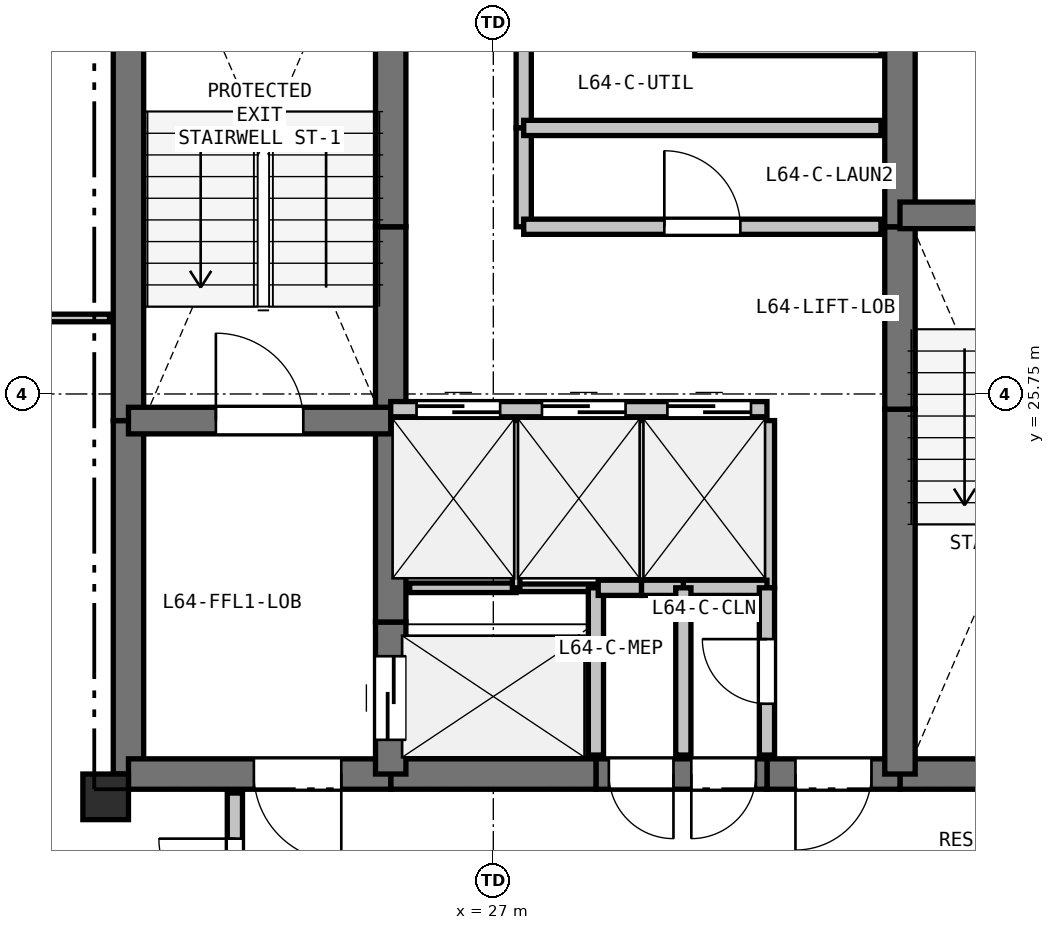
"""IFC4 building model, lengths in metres.
Left out: names, types, materials, properties, quantities, classifications, styles, units other than length and angle.
Written with IfcOpenShell. Run it as: python <this file> out.ifc"""

import sys

from ifc_helpers import new_model, si_unit, direction, frame, frame_2d, origin, origin_2d, place, context, subcontext, project, spatial, rectangle, extrude, element, fill, save


model = new_model("IFC4")
c1 = context("Model", 3, precision=1e-05, world=origin(), true_north=direction((0.0, 1.0)))
c2 = subcontext(c1, "Body", "Model", "MODEL_VIEW")
j1 = project(units=[si_unit("LENGTHUNIT", "METRE"), si_unit("PLANEANGLEUNIT", "RADIAN")], contexts=[c1])
p1 = place(None, origin())
s1 = spatial("IfcSite", under=j1, at=p1, CompositionType="ELEMENT")
p2 = place(p1, origin())
s2 = spatial("IfcBuilding", under=s1, at=p2, CompositionType="ELEMENT")
p3 = place(p2, frame((0.0, 0.0, 229.8)))
s3 = spatial("IfcBuildingStorey", under=s2, at=p3, CompositionType="ELEMENT", Elevation=229.8)
p4 = place(p3, frame((21.9, 20.45, 0.0), z_axis=(0.0, 0.0, 1.0), x_axis=(1.0, 0.0, 0.0)))
e1 = element("IfcColumn", 1, at=p4, inside=s3, PredefinedType="COLUMN", context=c2, shape_type="SweptSolid", body=[
    extrude(rectangle(XDim=0.6, YDim=0.6, at=origin_2d()), origin(), (0.0, 0.0, 1.0), 3.3),
])
p5 = place(p3, frame((22.2, 20.75, 0.0), z_axis=(0.0, 0.0, 1.0), x_axis=(0.0, 1.0, 0.0)))
e2 = element("IfcWall", 2, at=p5, inside=s3, PredefinedType="SHEAR", context=c2, shape_type="SweptSolid", body=[
    extrude(rectangle(XDim=4.65, YDim=0.4, at=frame_2d((2.325, 0.0))), origin(), (0.0, 0.0, 1.0), 3.08),
])
p6 = place(p3, frame((22.2, 25.4, 0.0), z_axis=(0.0, 0.0, 1.0), x_axis=(0.0, 1.0, 0.0)))
e3 = element("IfcWall", 3, at=p6, inside=s3, PredefinedType="SHEAR", context=c2, shape_type="SweptSolid", body=[
    extrude(rectangle(XDim=7.35, YDim=0.4, at=frame_2d((3.675, 0.0))), origin(), (0.0, 0.0, 1.0), 3.08),
])
p7 = place(p3, frame((35.8, 20.75, 0.0), z_axis=(0.0, 0.0, 1.0), x_axis=(-1.0, 0.0, 0.0)))
e4 = element("IfcWall", 4, at=p7, inside=s3, PredefinedType="SHEAR", context=c2, shape_type="SweptSolid", body=[
    extrude(rectangle(XDim=3.45, YDim=0.4, at=frame_2d((1.725, 0.0))), origin(), (0.0, 0.0, 1.0), 3.08),
])
p8 = place(p3, frame((32.35, 20.75, 0.0), z_axis=(0.0, 0.0, 1.0), x_axis=(-1.0, 0.0, 0.0)))
e5 = element("IfcWall", 5, at=p8, inside=s3, PredefinedType="SHEAR", context=c2, shape_type="SweptSolid", body=[
    extrude(rectangle(XDim=1.75, YDim=0.4, at=frame_2d((0.875, 0.0))), origin(), (0.0, 0.0, 1.0), 3.08),
])
p9 = place(p8, frame((0.375, 0.0, 0.0)))
e6 = element("IfcOpeningElement", 6, at=p9, cuts=e5, PredefinedType="OPENING", context=c2, shape_type="SweptSolid", body=[
    extrude(rectangle(XDim=1.0, YDim=2.15, at=frame_2d((0.5, 1.075))), frame((0.0, 0.21, 0.0), z_axis=(0.0, -1.0, 0.0), x_axis=(1.0, 0.0, 0.0)), (0.0, 0.0, 1.0), 0.42),
])
p10 = place(p3, frame((30.6, 20.75, 0.0), z_axis=(0.0, 0.0, 1.0), x_axis=(-1.0, 0.0, 0.0)))
e7 = element("IfcWall", 7, at=p10, inside=s3, PredefinedType="SHEAR", context=c2, shape_type="SweptSolid", body=[
    extrude(rectangle(XDim=2.25, YDim=0.4, at=frame_2d((1.125, 0.0))), origin(), (0.0, 0.0, 1.0), 3.08),
])
p11 = place(p10, frame((1.23, 0.0, 0.0)))
e8 = element("IfcOpeningElement", 8, at=p11, cuts=e7, PredefinedType="OPENING", context=c2, shape_type="SweptSolid", body=[
    extrude(rectangle(XDim=0.85, YDim=2.1, at=frame_2d((0.425, 1.05))), frame((0.0, 0.21, 0.0), z_axis=(0.0, -1.0, 0.0), x_axis=(1.0, 0.0, 0.0)), (0.0, 0.0, 1.0), 0.42),
])
p12 = place(p10, frame((0.145, 0.0, 0.0)))
e9 = element("IfcOpeningElement", 9, at=p12, cuts=e7, PredefinedType="OPENING", context=c2, shape_type="SweptSolid", body=[
    extrude(rectangle(XDim=0.85, YDim=2.1, at=frame_2d((0.425, 1.05))), frame((0.0, 0.21, 0.0), z_axis=(0.0, -1.0, 0.0), x_axis=(1.0, 0.0, 0.0)), (0.0, 0.0, 1.0), 0.42),
])
p13 = place(p3, frame((28.35, 20.75, 0.0), z_axis=(0.0, 0.0, 1.0), x_axis=(-1.0, 0.0, 0.0)))
e10 = element("IfcWall", 10, at=p13, inside=s3, PredefinedType="SHEAR", context=c2, shape_type="SweptSolid", body=[
    extrude(rectangle(XDim=2.7, YDim=0.4, at=frame_2d((1.35, 0.0))), origin(), (0.0, 0.0, 1.0), 3.08),
])
p14 = place(p3, frame((25.65, 20.75, 0.0), z_axis=(0.0, 0.0, 1.0), x_axis=(-1.0, 0.0, 0.0)))
e11 = element("IfcWall", 11, at=p14, inside=s3, PredefinedType="SHEAR", context=c2, shape_type="SweptSolid", body=[
    extrude(rectangle(XDim=3.45, YDim=0.4, at=frame_2d((1.725, 0.0))), origin(), (0.0, 0.0, 1.0), 3.08),
])
p15 = place(p14, frame((0.65, 0.0, 0.0)))
e12 = element("IfcOpeningElement", 12, at=p15, cuts=e11, PredefinedType="OPENING", context=c2, shape_type="SweptSolid", body=[
    extrude(rectangle(XDim=1.15, YDim=2.15, at=frame_2d((0.575, 1.075))), frame((0.0, 0.21, 0.0), z_axis=(0.0, -1.0, 0.0), x_axis=(1.0, 0.0, 0.0)), (0.0, 0.0, 1.0), 0.42),
])
p16 = place(p3, frame((25.65, 20.75, 0.0), z_axis=(0.0, 0.0, 1.0), x_axis=(0.0, 1.0, 0.0)))
e13 = element("IfcWall", 13, at=p16, inside=s3, PredefinedType="SHEAR", context=c2, shape_type="SweptSolid", body=[
    extrude(rectangle(XDim=2.0, YDim=0.4, at=frame_2d((1.0, 0.0))), origin(), (0.0, 0.0, 1.0), 3.08),
])
p17 = place(p16, frame((0.45, 0.0, 0.0)))
e14 = element("IfcOpeningElement", 14, at=p17, cuts=e13, PredefinedType="OPENING", context=c2, shape_type="SweptSolid", body=[
    extrude(rectangle(XDim=1.1, YDim=2.15, at=frame_2d((0.55, 1.075))), frame((0.0, 0.21, 0.0), z_axis=(0.0, -1.0, 0.0), x_axis=(1.0, 0.0, 0.0)), (0.0, 0.0, 1.0), 0.42),
])
p18 = place(p3, frame((25.65, 22.75, 0.0), z_axis=(0.0, 0.0, 1.0), x_axis=(0.0, 1.0, 0.0)))
e15 = element("IfcWall", 15, at=p18, inside=s3, PredefinedType="SHEAR", context=c2, shape_type="SweptSolid", body=[
    extrude(rectangle(XDim=2.8, YDim=0.4, at=frame_2d((1.4, 0.0))), origin(), (0.0, 0.0, 1.0), 3.08),
])
p19 = place(p3, frame((25.65, 25.55, 0.0), z_axis=(0.0, 0.0, 1.0), x_axis=(0.0, 1.0, 0.0)))
e16 = element("IfcWall", 16, at=p19, inside=s3, PredefinedType="SHEAR", context=c2, shape_type="SweptSolid", body=[
    extrude(rectangle(XDim=2.4, YDim=0.4, at=frame_2d((1.2, 0.0))), origin(), (0.0, 0.0, 1.0), 3.08),
])
for number, where, z_axis, x_axis in (
    (17, (25.65, 27.95, 0.0), (0.0, 0.0, 1.0), (0.0, 1.0, 0.0)),
    (18, (32.35, 20.75, 0.0), (0.0, 0.0, 1.0), (0.0, 1.0, 0.0)),
):
    element("IfcWall", number, at=place(p3, frame(where, z_axis=z_axis, x_axis=x_axis)), inside=s3, PredefinedType="SHEAR", context=c2, shape_type="SweptSolid", body=[
        extrude(rectangle(XDim=4.8, YDim=0.4, at=frame_2d((2.4, 0.0))), origin(), (0.0, 0.0, 1.0), 3.08),
    ])
p20 = place(p3, frame((32.35, 25.55, 0.0), z_axis=(0.0, 0.0, 1.0), x_axis=(0.0, 1.0, 0.0)))
e19 = element("IfcWall", 19, at=p20, inside=s3, PredefinedType="SHEAR", context=c2, shape_type="SweptSolid", body=[
    extrude(rectangle(XDim=2.4, YDim=0.4, at=frame_2d((1.2, 0.0))), origin(), (0.0, 0.0, 1.0), 3.08),
])
p21 = place(p3, frame((32.35, 27.95, 0.0), z_axis=(0.0, 0.0, 1.0), x_axis=(0.0, 1.0, 0.0)))
e20 = element("IfcWall", 20, at=p21, inside=s3, PredefinedType="SHEAR", context=c2, shape_type="SweptSolid", body=[
    extrude(rectangle(XDim=2.8, YDim=0.4, at=frame_2d((1.4, 0.0))), origin(), (0.0, 0.0, 1.0), 3.08),
])
p22 = place(p3, frame((22.2, 25.4, 0.0), z_axis=(0.0, 0.0, 1.0), x_axis=(1.0, 0.0, 0.0)))
e21 = element("IfcWall", 21, at=p22, inside=s3, PredefinedType="SHEAR", context=c2, shape_type="SweptSolid", body=[
    extrude(rectangle(XDim=3.45, YDim=0.35, at=frame_2d((1.725, 0.0))), origin(), (0.0, 0.0, 1.0), 3.08),
])
p23 = place(p22, frame((1.15, 0.0, 0.0)))
e22 = element("IfcOpeningElement", 22, at=p23, cuts=e21, PredefinedType="OPENING", context=c2, shape_type="SweptSolid", body=[
    extrude(rectangle(XDim=1.15, YDim=2.15, at=frame_2d((0.575, 1.075))), frame((0.0, 0.185, 0.0), z_axis=(0.0, -1.0, 0.0), x_axis=(1.0, 0.0, 0.0)), (0.0, 0.0, 1.0), 0.37),
])
p24 = place(p3, frame((32.35, 28.1, 0.0), z_axis=(0.0, 0.0, 1.0), x_axis=(1.0, 0.0, 0.0)))
e23 = element("IfcWall", 23, at=p24, inside=s3, PredefinedType="SHEAR", context=c2, shape_type="SweptSolid", body=[
    extrude(rectangle(XDim=3.45, YDim=0.35, at=frame_2d((1.725, 0.0))), origin(), (0.0, 0.0, 1.0), 3.08),
])
p25 = place(p24, frame((1.15, 0.0, 0.0)))
e24 = element("IfcOpeningElement", 24, at=p25, cuts=e23, PredefinedType="OPENING", context=c2, shape_type="SweptSolid", body=[
    extrude(rectangle(XDim=1.15, YDim=2.15, at=frame_2d((0.575, 1.075))), frame((0.0, 0.185, 0.0), z_axis=(0.0, -1.0, 0.0), x_axis=(1.0, 0.0, 0.0)), (0.0, 0.0, 1.0), 0.37),
])
p26 = place(p3, frame((25.65, 25.55, 0.0), z_axis=(0.0, 0.0, 1.0), x_axis=(1.0, 0.0, 0.0)))
e25 = element("IfcWall", 25, at=p26, inside=s3, PredefinedType="PARTITIONING", context=c2, shape_type="SweptSolid", body=[
    extrude(rectangle(XDim=4.95, YDim=0.2, at=frame_2d((2.475, 0.0))), origin(), (0.0, 0.0, 1.0), 3.08),
])
p27 = place(p26, frame((0.34, 0.0, 0.0)))
e26 = element("IfcOpeningElement", 26, at=p27, cuts=e25, PredefinedType="OPENING", context=c2, shape_type="SweptSolid", body=[
    extrude(rectangle(XDim=1.1, YDim=2.15, at=frame_2d((0.55, 1.075))), frame((0.0, 0.11, 0.0), z_axis=(0.0, -1.0, 0.0), x_axis=(1.0, 0.0, 0.0)), (0.0, 0.0, 1.0), 0.22),
])
p28 = place(p26, frame((1.99, 0.0, 0.0)))
e27 = element("IfcOpeningElement", 27, at=p28, cuts=e25, PredefinedType="OPENING", context=c2, shape_type="SweptSolid", body=[
    extrude(rectangle(XDim=1.1, YDim=2.15, at=frame_2d((0.55, 1.075))), frame((0.0, 0.11, 0.0), z_axis=(0.0, -1.0, 0.0), x_axis=(1.0, 0.0, 0.0)), (0.0, 0.0, 1.0), 0.22),
])
p29 = place(p26, frame((3.64, 0.0, 0.0)))
e28 = element("IfcOpeningElement", 28, at=p29, cuts=e25, PredefinedType="OPENING", context=c2, shape_type="SweptSolid", body=[
    extrude(rectangle(XDim=1.1, YDim=2.15, at=frame_2d((0.55, 1.075))), frame((0.0, 0.11, 0.0), z_axis=(0.0, -1.0, 0.0), x_axis=(1.0, 0.0, 0.0)), (0.0, 0.0, 1.0), 0.22),
])
p30 = place(p3, frame((25.9, 23.2, 0.0), z_axis=(0.0, 0.0, 1.0), x_axis=(1.0, 0.0, 0.0)))
e29 = element("IfcWall", 29, at=p30, inside=s3, PredefinedType="PARTITIONING", context=c2, shape_type="SweptSolid", body=[
    extrude(rectangle(XDim=1.4, YDim=0.125, at=frame_2d((0.7, 0.0))), origin(), (0.0, 0.0, 1.0), 3.08),
])
p31 = place(p3, frame((27.3, 23.2, 0.0), z_axis=(0.0, 0.0, 1.0), x_axis=(1.0, 0.0, 0.0)))
e30 = element("IfcWall", 30, at=p31, inside=s3, PredefinedType="PARTITIONING", context=c2, shape_type="SweptSolid", body=[
    extrude(rectangle(XDim=1.05, YDim=0.1, at=frame_2d((0.525, 0.0))), origin(), (0.0, 0.0, 1.0), 3.08),
])
p32 = place(p3, frame((28.35, 23.2, 0.0), z_axis=(0.0, 0.0, 1.0), x_axis=(0.0, -1.0, 0.0)))
e31 = element("IfcWall", 31, at=p32, inside=s3, PredefinedType="PARTITIONING", context=c2, shape_type="SweptSolid", body=[
    extrude(rectangle(XDim=2.2, YDim=0.2, at=frame_2d((1.1, 0.0))), origin(), (0.0, 0.0, 1.0), 3.08),
])
p33 = place(p3, frame((32.1, 30.3, 0.0), z_axis=(0.0, 0.0, 1.0), x_axis=(-1.0, 0.0, 0.0)))
e32 = element("IfcWall", 32, at=p33, inside=s3, PredefinedType="PARTITIONING", context=c2, shape_type="SweptSolid", body=[
    extrude(rectangle(XDim=2.45, YDim=0.2, at=frame_2d((1.225, 0.0))), origin(), (0.0, 0.0, 1.0), 3.08),
])
p34 = place(p3, frame((27.3, 25.4, 0.0), z_axis=(0.0, 0.0, 1.0), x_axis=(0.0, -1.0, 0.0)))
e33 = element("IfcWall", 33, at=p34, inside=s3, PredefinedType="PARTITIONING", context=c2, shape_type="SweptSolid", body=[
    extrude(rectangle(XDim=2.2, YDim=0.1, at=frame_2d((1.1, 0.0))), origin(), (0.0, 0.0, 1.0), 3.08),
])
p35 = place(p3, frame((28.95, 25.4, 0.0), z_axis=(0.0, 0.0, 1.0), x_axis=(0.0, -1.0, 0.0)))
e34 = element("IfcWall", 34, at=p35, inside=s3, PredefinedType="PARTITIONING", context=c2, shape_type="SweptSolid", body=[
    extrude(rectangle(XDim=2.2, YDim=0.125, at=frame_2d((1.1, 0.0))), origin(), (0.0, 0.0, 1.0), 3.08),
])
p36 = place(p3, frame((28.95, 23.2, 0.0), z_axis=(0.0, 0.0, 1.0), x_axis=(-1.0, 0.0, 0.0)))
e35 = element("IfcWall", 35, at=p36, inside=s3, PredefinedType="PARTITIONING", context=c2, shape_type="SweptSolid", body=[
    extrude(rectangle(XDim=0.57, YDim=0.2, at=frame_2d((0.285, 0.0))), origin(), (0.0, 0.0, 1.0), 3.08),
])
p37 = place(p3, frame((30.6, 25.4, 0.0), z_axis=(0.0, 0.0, 1.0), x_axis=(0.0, -1.0, 0.0)))
e36 = element("IfcWall", 36, at=p37, inside=s3, PredefinedType="PARTITIONING", context=c2, shape_type="SweptSolid", body=[
    extrude(rectangle(XDim=2.2, YDim=0.2, at=frame_2d((1.1, 0.0))), origin(), (0.0, 0.0, 1.0), 3.08),
])
p38 = place(p3, frame((30.6, 23.2, 0.0), z_axis=(0.0, 0.0, 1.0), x_axis=(-1.0, 0.0, 0.0)))
e37 = element("IfcWall", 37, at=p38, inside=s3, PredefinedType="PARTITIONING", context=c2, shape_type="SweptSolid", body=[
    extrude(rectangle(XDim=1.1, YDim=0.2, at=frame_2d((0.55, 0.0))), origin(), (0.0, 0.0, 1.0), 3.08),
])
p39 = place(p3, frame((29.5, 23.2, 0.0), z_axis=(0.0, 0.0, 1.0), x_axis=(-1.0, 0.0, 0.0)))
e38 = element("IfcWall", 38, at=p39, inside=s3, PredefinedType="PARTITIONING", context=c2, shape_type="SweptSolid", body=[
    extrude(rectangle(XDim=0.55, YDim=0.2, at=frame_2d((0.275, 0.0))), origin(), (0.0, 0.0, 1.0), 3.08),
])
p40 = place(p3, frame((30.6, 21.0, 0.0), z_axis=(0.0, 0.0, 1.0), x_axis=(0.0, 1.0, 0.0)))
e39 = element("IfcWall", 39, at=p40, inside=s3, PredefinedType="PARTITIONING", context=c2, shape_type="SweptSolid", body=[
    extrude(rectangle(XDim=2.2, YDim=0.2, at=frame_2d((1.1, 0.0))), origin(), (0.0, 0.0, 1.0), 3.08),
])
p41 = place(p40, frame((0.675, 0.0, 0.0)))
e40 = element("IfcOpeningElement", 40, at=p41, cuts=e39, PredefinedType="OPENING", context=c2, shape_type="SweptSolid", body=[
    extrude(rectangle(XDim=0.85, YDim=2.1, at=frame_2d((0.425, 1.05))), frame((0.0, 0.11, 0.0), z_axis=(0.0, -1.0, 0.0), x_axis=(1.0, 0.0, 0.0)), (0.0, 0.0, 1.0), 0.22),
])
p42 = place(p3, frame((27.4, 32.5, 0.0), z_axis=(0.0, 0.0, 1.0), x_axis=(0.0, -1.0, 0.0)))
e41 = element("IfcWall", 41, at=p42, inside=s3, PredefinedType="PARTITIONING", context=c2, shape_type="SweptSolid", body=[
    extrude(rectangle(XDim=3.25, YDim=0.2, at=frame_2d((1.625, 0.0))), origin(), (0.0, 0.0, 1.0), 3.08),
])
p43 = place(p42, frame((1.2, 0.0, 0.0)))
e42 = element("IfcOpeningElement", 42, at=p43, cuts=e41, PredefinedType="OPENING", context=c2, shape_type="SweptSolid", body=[
    extrude(rectangle(XDim=0.85, YDim=2.1, at=frame_2d((0.425, 1.05))), frame((0.0, 0.11, 0.0), z_axis=(0.0, -1.0, 0.0), x_axis=(1.0, 0.0, 0.0)), (0.0, 0.0, 1.0), 0.22),
])
p44 = place(p3, frame((27.4, 29.25, 0.0), z_axis=(0.0, 0.0, 1.0), x_axis=(0.0, -1.0, 0.0)))
e43 = element("IfcWall", 43, at=p44, inside=s3, PredefinedType="PARTITIONING", context=c2, shape_type="SweptSolid", body=[
    extrude(rectangle(XDim=1.3, YDim=0.2, at=frame_2d((0.65, 0.0))), origin(), (0.0, 0.0, 1.0), 3.08),
])
p45 = place(p3, frame((27.4, 27.95, 0.0), z_axis=(0.0, 0.0, 1.0), x_axis=(1.0, 0.0, 0.0)))
e44 = element("IfcWall", 44, at=p45, inside=s3, PredefinedType="PARTITIONING", context=c2, shape_type="SweptSolid", body=[
    extrude(rectangle(XDim=4.7, YDim=0.2, at=frame_2d((2.35, 0.0))), origin(), (0.0, 0.0, 1.0), 3.08),
])
p46 = place(p45, frame((1.85, 0.0, 0.0)))
e45 = element("IfcOpeningElement", 45, at=p46, cuts=e44, PredefinedType="OPENING", context=c2, shape_type="SweptSolid", body=[
    extrude(rectangle(XDim=1.0, YDim=2.15, at=frame_2d((0.5, 1.075))), frame((0.0, 0.11, 0.0), z_axis=(0.0, -1.0, 0.0), x_axis=(1.0, 0.0, 0.0)), (0.0, 0.0, 1.0), 0.22),
])
p47 = place(p3, frame((23.6, 18.3, 0.0), z_axis=(0.0, 0.0, 1.0), x_axis=(0.0, 1.0, 0.0)))
e46 = element("IfcWall", 46, at=p47, inside=s3, PredefinedType="PARTITIONING", context=c2, shape_type="SweptSolid", body=[
    extrude(rectangle(XDim=2.2, YDim=0.2, at=frame_2d((1.1, 0.0))), origin(), (0.0, 0.0, 1.0), 2.528),
])
p48 = place(p47, frame((0.6, 0.0, 0.0)))
e47 = element("IfcOpeningElement", 47, at=p48, cuts=e46, PredefinedType="OPENING", context=c2, shape_type="SweptSolid", body=[
    extrude(rectangle(XDim=1.0, YDim=2.15, at=frame_2d((0.5, 1.075))), frame((0.0, 0.11, 0.0), z_axis=(0.0, -1.0, 0.0), x_axis=(1.0, 0.0, 0.0)), (0.0, 0.0, 1.0), 0.22),
])
p49 = place(p3, frame((32.1, 29.25, 0.0), z_axis=(0.0, 0.0, 1.0), x_axis=(-1.0, 0.0, 0.0)))
e48 = element("IfcWall", 48, at=p49, inside=s3, PredefinedType="PARTITIONING", context=c2, shape_type="SweptSolid", body=[
    extrude(rectangle(XDim=4.7, YDim=0.2, at=frame_2d((2.35, 0.0))), origin(), (0.0, 0.0, 1.0), 3.08),
])
p50 = place(p3, frame((29.5, 23.2, 0.0), z_axis=(0.0, 0.0, 1.0), x_axis=(0.0, -1.0, 0.0)))
e49 = element("IfcWall", 49, at=p50, inside=s3, PredefinedType="PARTITIONING", context=c2, shape_type="SweptSolid", body=[
    extrude(rectangle(XDim=2.2, YDim=0.2, at=frame_2d((1.1, 0.0))), origin(), (0.0, 0.0, 1.0), 3.08),
])
p51 = place(p3, frame((21.95, 26.75, 0.0), z_axis=(0.0, 0.0, 1.0), x_axis=(-1.0, 0.0, 0.0)))
e50 = element("IfcWall", 50, at=p51, inside=s3, PredefinedType="PARTITIONING", context=c2, shape_type="SweptSolid", body=[
    extrude(rectangle(XDim=11.082, YDim=0.1, at=frame_2d((5.541, 0.0))), origin(), (0.0, 0.0, 1.0), 2.605),
])
p52 = place(p27, origin())
e51 = element("IfcDoor", 51, at=p52, inside=s3, OperationType="SLIDING_TO_LEFT", PredefinedType="DOOR", context=c2, shape_type="SweptSolid", body=[
    extrude(rectangle(XDim=1.1, YDim=2.15, at=frame_2d((0.55, 1.075))), frame((0.0, 0.025, 0.0), z_axis=(0.0, -1.0, 0.0), x_axis=(1.0, 0.0, 0.0)), (0.0, 0.0, 1.0), 0.05),
])
fill(e26, e51)
p53 = place(p28, origin())
e52 = element("IfcDoor", 52, at=p53, inside=s3, OperationType="SLIDING_TO_LEFT", PredefinedType="DOOR", context=c2, shape_type="SweptSolid", body=[
    extrude(rectangle(XDim=1.1, YDim=2.15, at=frame_2d((0.55, 1.075))), frame((0.0, 0.025, 0.0), z_axis=(0.0, -1.0, 0.0), x_axis=(1.0, 0.0, 0.0)), (0.0, 0.0, 1.0), 0.05),
])
fill(e27, e52)
p54 = place(p29, origin())
e53 = element("IfcDoor", 53, at=p54, inside=s3, OperationType="SLIDING_TO_LEFT", PredefinedType="DOOR", context=c2, shape_type="SweptSolid", body=[
    extrude(rectangle(XDim=1.1, YDim=2.15, at=frame_2d((0.55, 1.075))), frame((0.0, 0.025, 0.0), z_axis=(0.0, -1.0, 0.0), x_axis=(1.0, 0.0, 0.0)), (0.0, 0.0, 1.0), 0.05),
])
fill(e28, e53)
p55 = place(p9, origin())
e54 = element("IfcDoor", 54, at=p55, inside=s3, OperationType="SINGLE_SWING_RIGHT", PredefinedType="DOOR", context=c2, shape_type="SweptSolid", body=[
    extrude(rectangle(XDim=1.0, YDim=2.15, at=frame_2d((0.5, 1.075))), frame((0.0, 0.025, 0.0), z_axis=(0.0, -1.0, 0.0), x_axis=(1.0, 0.0, 0.0)), (0.0, 0.0, 1.0), 0.05),
])
fill(e6, e54)
p56 = place(p17, origin())
e55 = element("IfcDoor", 55, at=p56, inside=s3, OperationType="SLIDING_TO_LEFT", PredefinedType="DOOR", context=c2, shape_type="SweptSolid", body=[
    extrude(rectangle(XDim=1.1, YDim=2.15, at=frame_2d((0.55, 1.075))), frame((0.0, 0.025, 0.0), z_axis=(0.0, -1.0, 0.0), x_axis=(1.0, 0.0, 0.0)), (0.0, 0.0, 1.0), 0.05),
])
fill(e14, e55)
p57 = place(p23, origin())
e56 = element("IfcDoor", 56, at=p57, inside=s3, OperationType="SINGLE_SWING_LEFT", PredefinedType="DOOR", context=c2, shape_type="SweptSolid", body=[
    extrude(rectangle(XDim=1.15, YDim=2.15, at=frame_2d((0.575, 1.075))), frame((0.0, 0.025, 0.0), z_axis=(0.0, -1.0, 0.0), x_axis=(1.0, 0.0, 0.0)), (0.0, 0.0, 1.0), 0.05),
])
fill(e22, e56)
p58 = place(p15, origin())
e57 = element("IfcDoor", 57, at=p58, inside=s3, OperationType="SINGLE_SWING_LEFT", PredefinedType="DOOR", context=c2, shape_type="SweptSolid", body=[
    extrude(rectangle(XDim=1.15, YDim=2.15, at=frame_2d((0.575, 1.075))), frame((0.0, 0.025, 0.0), z_axis=(0.0, -1.0, 0.0), x_axis=(1.0, 0.0, 0.0)), (0.0, 0.0, 1.0), 0.05),
])
fill(e12, e57)
p59 = place(p46, origin())
e58 = element("IfcDoor", 58, at=p59, inside=s3, OperationType="SINGLE_SWING_LEFT", PredefinedType="DOOR", context=c2, shape_type="SweptSolid", body=[
    extrude(rectangle(XDim=1.0, YDim=2.15, at=frame_2d((0.5, 1.075))), frame((0.0, 0.025, 0.0), z_axis=(0.0, -1.0, 0.0), x_axis=(1.0, 0.0, 0.0)), (0.0, 0.0, 1.0), 0.05),
])
fill(e45, e58)
p60 = place(p41, origin())
e59 = element("IfcDoor", 59, at=p60, inside=s3, OperationType="SINGLE_SWING_RIGHT", PredefinedType="DOOR", context=c2, shape_type="SweptSolid", body=[
    extrude(rectangle(XDim=0.85, YDim=2.1, at=frame_2d((0.425, 1.05))), frame((0.0, 0.025, 0.0), z_axis=(0.0, -1.0, 0.0), x_axis=(1.0, 0.0, 0.0)), (0.0, 0.0, 1.0), 0.05),
])
fill(e40, e59)
p61 = place(p11, origin())
e60 = element("IfcDoor", 60, at=p61, inside=s3, OperationType="SINGLE_SWING_LEFT", PredefinedType="DOOR", context=c2, shape_type="SweptSolid", body=[
    extrude(rectangle(XDim=0.85, YDim=2.1, at=frame_2d((0.425, 1.05))), frame((0.0, 0.025, 0.0), z_axis=(0.0, -1.0, 0.0), x_axis=(1.0, 0.0, 0.0)), (0.0, 0.0, 1.0), 0.05),
])
fill(e8, e60)
p62 = place(p12, origin())
e61 = element("IfcDoor", 61, at=p62, inside=s3, OperationType="SINGLE_SWING_RIGHT", PredefinedType="DOOR", context=c2, shape_type="SweptSolid", body=[
    extrude(rectangle(XDim=0.85, YDim=2.1, at=frame_2d((0.425, 1.05))), frame((0.0, 0.025, 0.0), z_axis=(0.0, -1.0, 0.0), x_axis=(1.0, 0.0, 0.0)), (0.0, 0.0, 1.0), 0.05),
])
fill(e9, e61)
p63 = place(p48, origin())
e62 = element("IfcDoor", 62, at=p63, inside=s3, OperationType="SINGLE_SWING_RIGHT", PredefinedType="DOOR", context=c2, shape_type="SweptSolid", body=[
    extrude(rectangle(XDim=1.0, YDim=2.15, at=frame_2d((0.5, 1.075))), frame((0.0, 0.025, 0.0), z_axis=(0.0, -1.0, 0.0), x_axis=(1.0, 0.0, 0.0)), (0.0, 0.0, 1.0), 0.05),
])
fill(e47, e62)
save(model, sys.argv[1])
